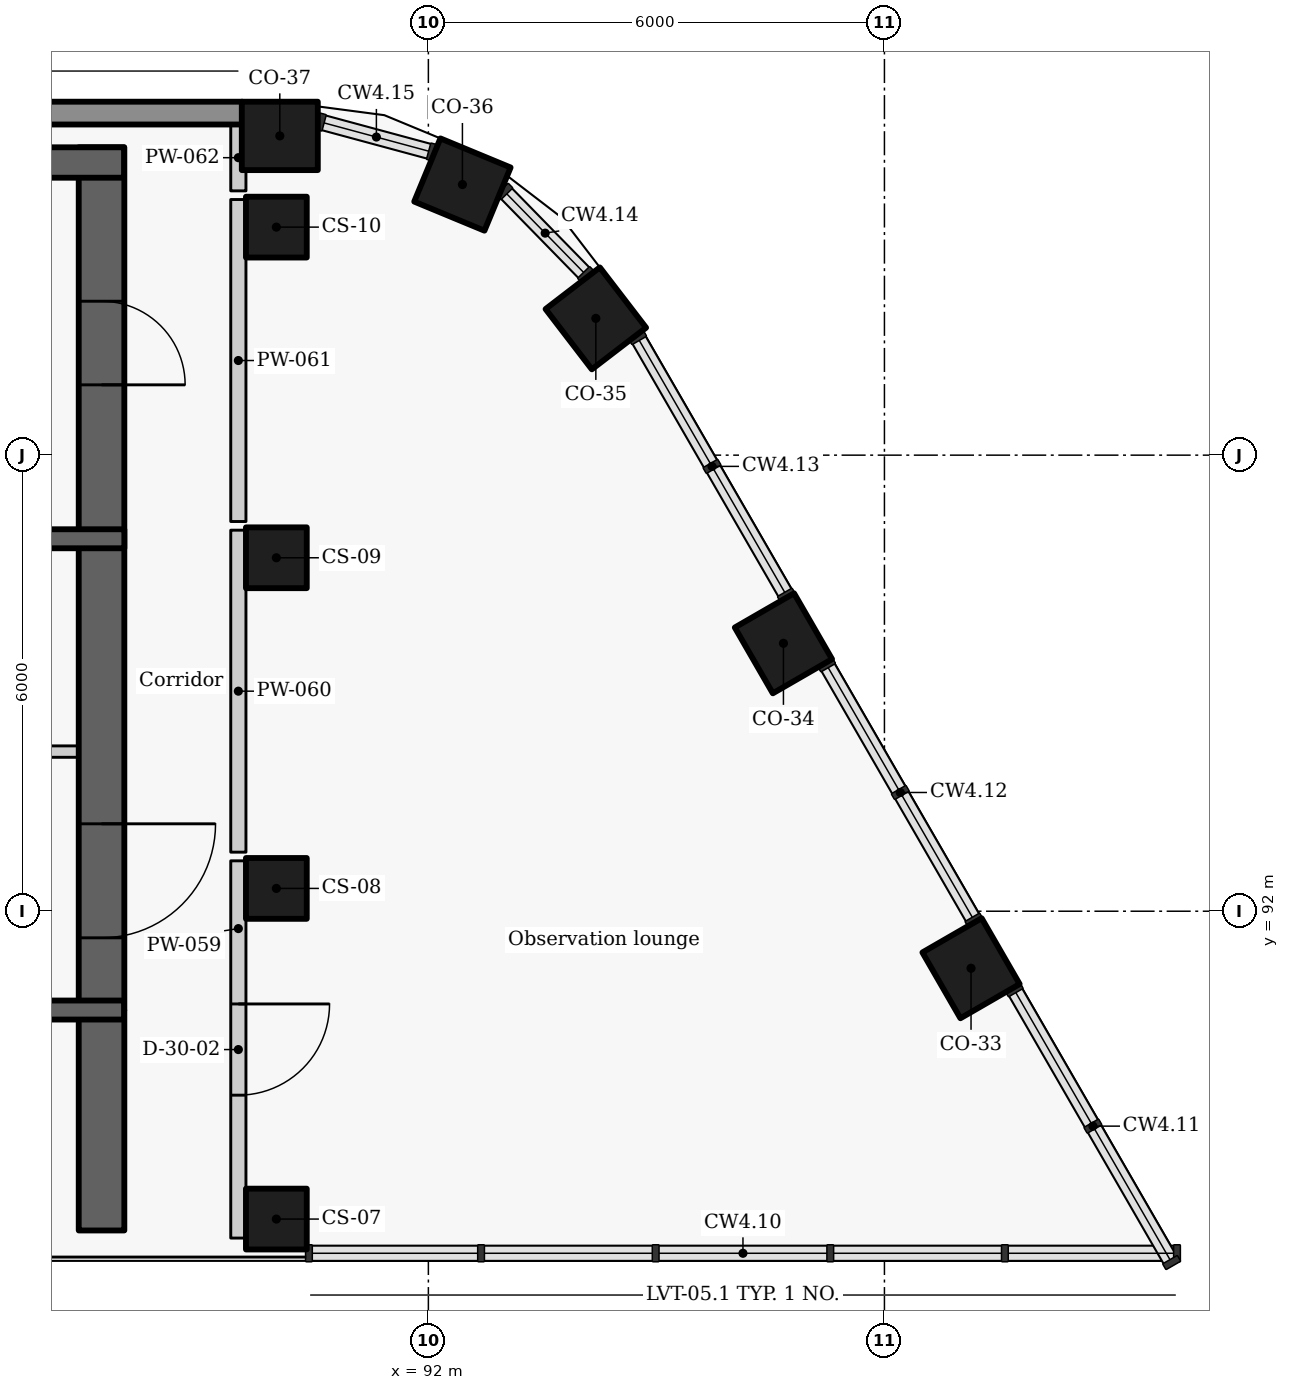
"""IFC4 building model, lengths in metres.
Left out: names, types, materials, properties, quantities, classifications, styles, units other than length and angle.
Written with IfcOpenShell. Run it as: python <this file> out.ifc"""

import sys

from ifc_helpers import new_model, si_unit, direction, frame, frame_2d, origin, origin_2d, place, context, subcontext, project, spatial, rectangle, extrude, element, fill, save


model = new_model("IFC4")
c1 = context("Model", 3, precision=1e-05, world=origin(), true_north=direction((0.0, 1.0)))
c2 = subcontext(c1, "Body", "Model", "MODEL_VIEW")
j1 = project(units=[si_unit("LENGTHUNIT", "METRE"), si_unit("PLANEANGLEUNIT", "RADIAN")], contexts=[c1])
p1 = place(None, origin())
s1 = spatial("IfcSite", under=j1, at=p1, CompositionType="ELEMENT")
p2 = place(p1, origin())
s2 = spatial("IfcBuilding", under=s1, at=p2, CompositionType="ELEMENT")
p3 = place(p2, frame((0.0, 0.0, 286.8)))
s3 = spatial("IfcBuildingStorey", under=s2, at=p3, CompositionType="ELEMENT", Elevation=286.8)
for number, where, z_axis, x_axis in (
    (1, (99.139, 91.25, 0.0), (0.0, 0.0, 1.0), (-0.5, 0.866, 0.0)),
    (2, (96.671, 95.525, 0.0), (0.0, 0.0, 1.0), (-0.5, 0.866, 0.0)),
    (3, (94.203, 99.8, 0.0), (0.0, 0.0, 1.0), (-0.609, 0.793, 0.0)),
    (4, (92.448, 101.56, 0.0), (0.0, 0.0, 1.0), (-0.924, 0.383, 0.0)),
    (5, (90.045, 102.2, 0.0), (0.0, 0.0, 1.0), (-1.0, 0.0, 0.0)),
):
    element("IfcColumn", number, at=place(p3, frame(where, z_axis=z_axis, x_axis=x_axis)), inside=s3, PredefinedType="COLUMN", context=c2, shape_type="SweptSolid", body=[
        extrude(rectangle(XDim=1.0, YDim=0.9, at=origin_2d()), origin(), (0.0, 0.0, 1.0), 3.6),
    ])
for number, where, z_axis, x_axis in (
    (6, (90.0, 87.95, 0.0), (0.0, 0.0, 1.0), (0.0, 1.0, 0.0)),
    (7, (90.0, 92.3, 0.0), (0.0, 0.0, 1.0), (0.0, 1.0, 0.0)),
    (8, (90.0, 96.65, 0.0), (0.0, 0.0, 1.0), (0.0, 1.0, 0.0)),
    (9, (90.0, 101.0, 0.0), (0.0, 0.0, 1.0), (0.0, 1.0, 0.0)),
):
    element("IfcColumn", number, at=place(p3, frame(where, z_axis=z_axis, x_axis=x_axis)), inside=s3, PredefinedType="COLUMN", context=c2, shape_type="SweptSolid", body=[
        extrude(rectangle(XDim=0.8, YDim=0.8, at=origin_2d()), origin(), (0.0, 0.0, 1.0), 3.6),
    ])
p4 = place(p3, frame((89.549, 102.5, 0.0), z_axis=(0.0, 0.0, 1.0), x_axis=(-1.0, 0.0, 0.0)))
e10 = element("IfcWall", 10, at=p4, inside=s3, PredefinedType="SOLIDWALL", context=c2, shape_type="SweptSolid", body=[
    extrude(rectangle(XDim=19.134, YDim=0.3, at=frame_2d((9.567, 0.0))), origin(), (0.0, 0.0, 1.0), 2.725),
])
p5 = place(p3, frame((85.397, 94.1, 0.0), z_axis=(0.0, 0.0, 1.0), x_axis=(1.0, 0.0, 0.0)))
e11 = element("IfcWall", 11, at=p5, inside=s3, PredefinedType="PARTITIONING", context=c2, shape_type="SweptSolid", body=[
    extrude(rectangle(XDim=2.603, YDim=0.15, at=frame_2d((1.302, 0.0))), origin(), (0.0, 0.0, 1.0), 3.325),
])
p6 = place(p5, frame((0.528, 0.0, 0.0)))
e12 = element("IfcOpeningElement", 12, at=p6, cuts=e11, PredefinedType="OPENING", context=c2, shape_type="SweptSolid", body=[
    extrude(rectangle(XDim=0.9, YDim=2.1, at=frame_2d((0.45, 1.05))), frame((0.0, 0.085, 0.0), z_axis=(0.0, -1.0, 0.0), x_axis=(1.0, 0.0, 0.0)), (0.0, 0.0, 1.0), 0.17),
])
p7 = place(p3, frame((87.7, 102.05, -0.275), z_axis=(0.0, 0.0, 1.0), x_axis=(0.0, -1.0, 0.0)))
e13 = element("IfcWall", 13, at=p7, inside=s3, PredefinedType="SHEAR", context=c2, shape_type="SweptSolid", body=[
    extrude(rectangle(XDim=11.35, YDim=0.6, at=frame_2d((5.675, 0.0))), origin(), (0.0, 0.0, 1.0), 3.6),
])
p8 = place(p7, frame((8.9, 0.0, 0.275)))
e14 = element("IfcOpeningElement", 14, at=p8, cuts=e13, PredefinedType="OPENING", context=c2, shape_type="SweptSolid", body=[
    extrude(rectangle(XDim=1.5, YDim=2.1, at=frame_2d((0.75, 1.05))), frame((0.0, 0.31, 0.0), z_axis=(0.0, -1.0, 0.0), x_axis=(1.0, 0.0, 0.0)), (0.0, 0.0, 1.0), 0.62),
])
p9 = place(p7, frame((2.025, 0.0, 0.275)))
e15 = element("IfcOpeningElement", 15, at=p9, cuts=e13, PredefinedType="OPENING", context=c2, shape_type="SweptSolid", body=[
    extrude(rectangle(XDim=1.1, YDim=2.1, at=frame_2d((0.55, 1.05))), frame((0.0, 0.31, 0.0), z_axis=(0.0, -1.0, 0.0), x_axis=(1.0, 0.0, 0.0)), (0.0, 0.0, 1.0), 0.62),
])
p10 = place(p3, frame((80.547, 96.9, -0.275), z_axis=(0.0, 0.0, 1.0), x_axis=(1.0, 0.0, 0.0)))
e16 = element("IfcWall", 16, at=p10, inside=s3, PredefinedType="SHEAR", context=c2, shape_type="SweptSolid", body=[
    extrude(rectangle(XDim=7.453, YDim=0.25, at=frame_2d((3.727, 0.0))), origin(), (0.0, 0.0, 1.0), 3.6),
])
p11 = place(p10, frame((3.302, 0.0, 0.275)))
e17 = element("IfcOpeningElement", 17, at=p11, cuts=e16, PredefinedType="OPENING", context=c2, shape_type="SweptSolid", body=[
    extrude(rectangle(XDim=1.1, YDim=2.1, at=frame_2d((0.55, 1.05))), frame((0.0, 0.135, 0.0), z_axis=(0.0, -1.0, 0.0), x_axis=(1.0, 0.0, 0.0)), (0.0, 0.0, 1.0), 0.27),
])
p12 = place(p3, frame((89.5, 92.663, 0.0), z_axis=(0.0, 0.0, 1.0), x_axis=(0.0, -1.0, 0.0)))
e18 = element("IfcWall", 18, at=p12, inside=s3, PredefinedType="PARTITIONING", context=c2, shape_type="SweptSolid", body=[
    extrude(rectangle(XDim=4.963, YDim=0.2, at=frame_2d((2.481, 0.0))), origin(), (0.0, 0.0, 1.0), 3.325),
])
p13 = place(p12, frame((1.883, 0.0, 0.0)))
e19 = element("IfcOpeningElement", 19, at=p13, cuts=e18, PredefinedType="OPENING", context=c2, shape_type="SweptSolid", body=[
    extrude(rectangle(XDim=1.2, YDim=2.1, at=frame_2d((0.6, 1.05))), frame((0.0, 0.11, 0.0), z_axis=(0.0, -1.0, 0.0), x_axis=(1.0, 0.0, 0.0)), (0.0, 0.0, 1.0), 0.22),
])
p14 = place(p3, frame((89.5, 92.777, 0.0), z_axis=(0.0, 0.0, 1.0), x_axis=(0.0, 1.0, 0.0)))
e20 = element("IfcWall", 20, at=p14, inside=s3, PredefinedType="PARTITIONING", context=c2, shape_type="SweptSolid", body=[
    extrude(rectangle(XDim=4.236, YDim=0.2, at=frame_2d((2.118, 0.0))), origin(), (0.0, 0.0, 1.0), 3.325),
])
p15 = place(p3, frame((89.5, 97.127, 0.0), z_axis=(0.0, 0.0, 1.0), x_axis=(0.0, 1.0, 0.0)))
e21 = element("IfcWall", 21, at=p15, inside=s3, PredefinedType="PARTITIONING", context=c2, shape_type="SweptSolid", body=[
    extrude(rectangle(XDim=4.236, YDim=0.2, at=frame_2d((2.118, 0.0))), origin(), (0.0, 0.0, 1.0), 3.325),
])
p16 = place(p3, frame((89.5, 101.477, 0.0), z_axis=(0.0, 0.0, 1.0), x_axis=(0.0, 1.0, 0.0)))
e22 = element("IfcWall", 22, at=p16, inside=s3, PredefinedType="PARTITIONING", context=c2, shape_type="SweptSolid", body=[
    extrude(rectangle(XDim=0.873, YDim=0.2, at=frame_2d((0.437, 0.0))), origin(), (0.0, 0.0, 1.0), 3.325),
])
p17 = place(p3, frame((87.7, 87.8, -0.275), z_axis=(0.0, 0.0, 1.0), x_axis=(0.0, 1.0, 0.0)))
e23 = element("IfcWall", 23, at=p17, inside=s3, PredefinedType="SHEAR", context=c2, shape_type="SweptSolid", body=[
    extrude(rectangle(XDim=2.896, YDim=0.6, at=frame_2d((1.448, 0.0))), origin(), (0.0, 0.0, 1.0), 3.6),
])
p18 = place(p3, frame((85.404, 90.7, -0.275), z_axis=(0.0, 0.0, 1.0), x_axis=(1.0, 0.0, 0.0)))
e24 = element("IfcWall", 24, at=p18, inside=s3, PredefinedType="SHEAR", context=c2, shape_type="SweptSolid", body=[
    extrude(rectangle(XDim=2.592, YDim=0.25, at=frame_2d((1.296, 0.0))), origin(), (0.0, 0.0, 1.0), 3.6),
])
p19 = place(p3, frame((72.004, 101.85, -0.275), z_axis=(0.0, 0.0, 1.0), x_axis=(1.0, 0.0, 0.0)))
e25 = element("IfcWall", 25, at=p19, inside=s3, PredefinedType="SHEAR", context=c2, shape_type="SweptSolid", body=[
    extrude(rectangle(XDim=15.992, YDim=0.4, at=frame_2d((7.996, 0.0))), origin(), (0.0, 0.0, 1.0), 3.6),
])
p20 = place(p13, origin())
e26 = element("IfcDoor", 26, at=p20, inside=s3, OperationType="SINGLE_SWING_LEFT", PredefinedType="DOOR", context=c2, shape_type="SweptSolid", body=[
    extrude(rectangle(XDim=1.2, YDim=2.1, at=frame_2d((0.6, 1.05))), frame((0.0, 0.025, 0.0), z_axis=(0.0, -1.0, 0.0), x_axis=(1.0, 0.0, 0.0)), (0.0, 0.0, 1.0), 0.05),
])
fill(e19, e26)
p21 = place(p8, origin())
e27 = element("IfcDoor", 27, at=p21, inside=s3, OperationType="DOUBLE_DOOR_SINGLE_SWING", PredefinedType="DOOR", context=c2, shape_type="SweptSolid", body=[
    extrude(rectangle(XDim=1.5, YDim=2.1, at=frame_2d((0.75, 1.05))), frame((0.0, 0.025, 0.0), z_axis=(0.0, -1.0, 0.0), x_axis=(1.0, 0.0, 0.0)), (0.0, 0.0, 1.0), 0.05),
])
fill(e14, e27)
p22 = place(p9, origin())
e28 = element("IfcDoor", 28, at=p22, inside=s3, OperationType="SINGLE_SWING_RIGHT", PredefinedType="DOOR", context=c2, shape_type="SweptSolid", body=[
    extrude(rectangle(XDim=1.1, YDim=2.1, at=frame_2d((0.55, 1.05))), frame((0.0, 0.025, 0.0), z_axis=(0.0, -1.0, 0.0), x_axis=(1.0, 0.0, 0.0)), (0.0, 0.0, 1.0), 0.05),
])
fill(e15, e28)
save(model, sys.argv[1])
